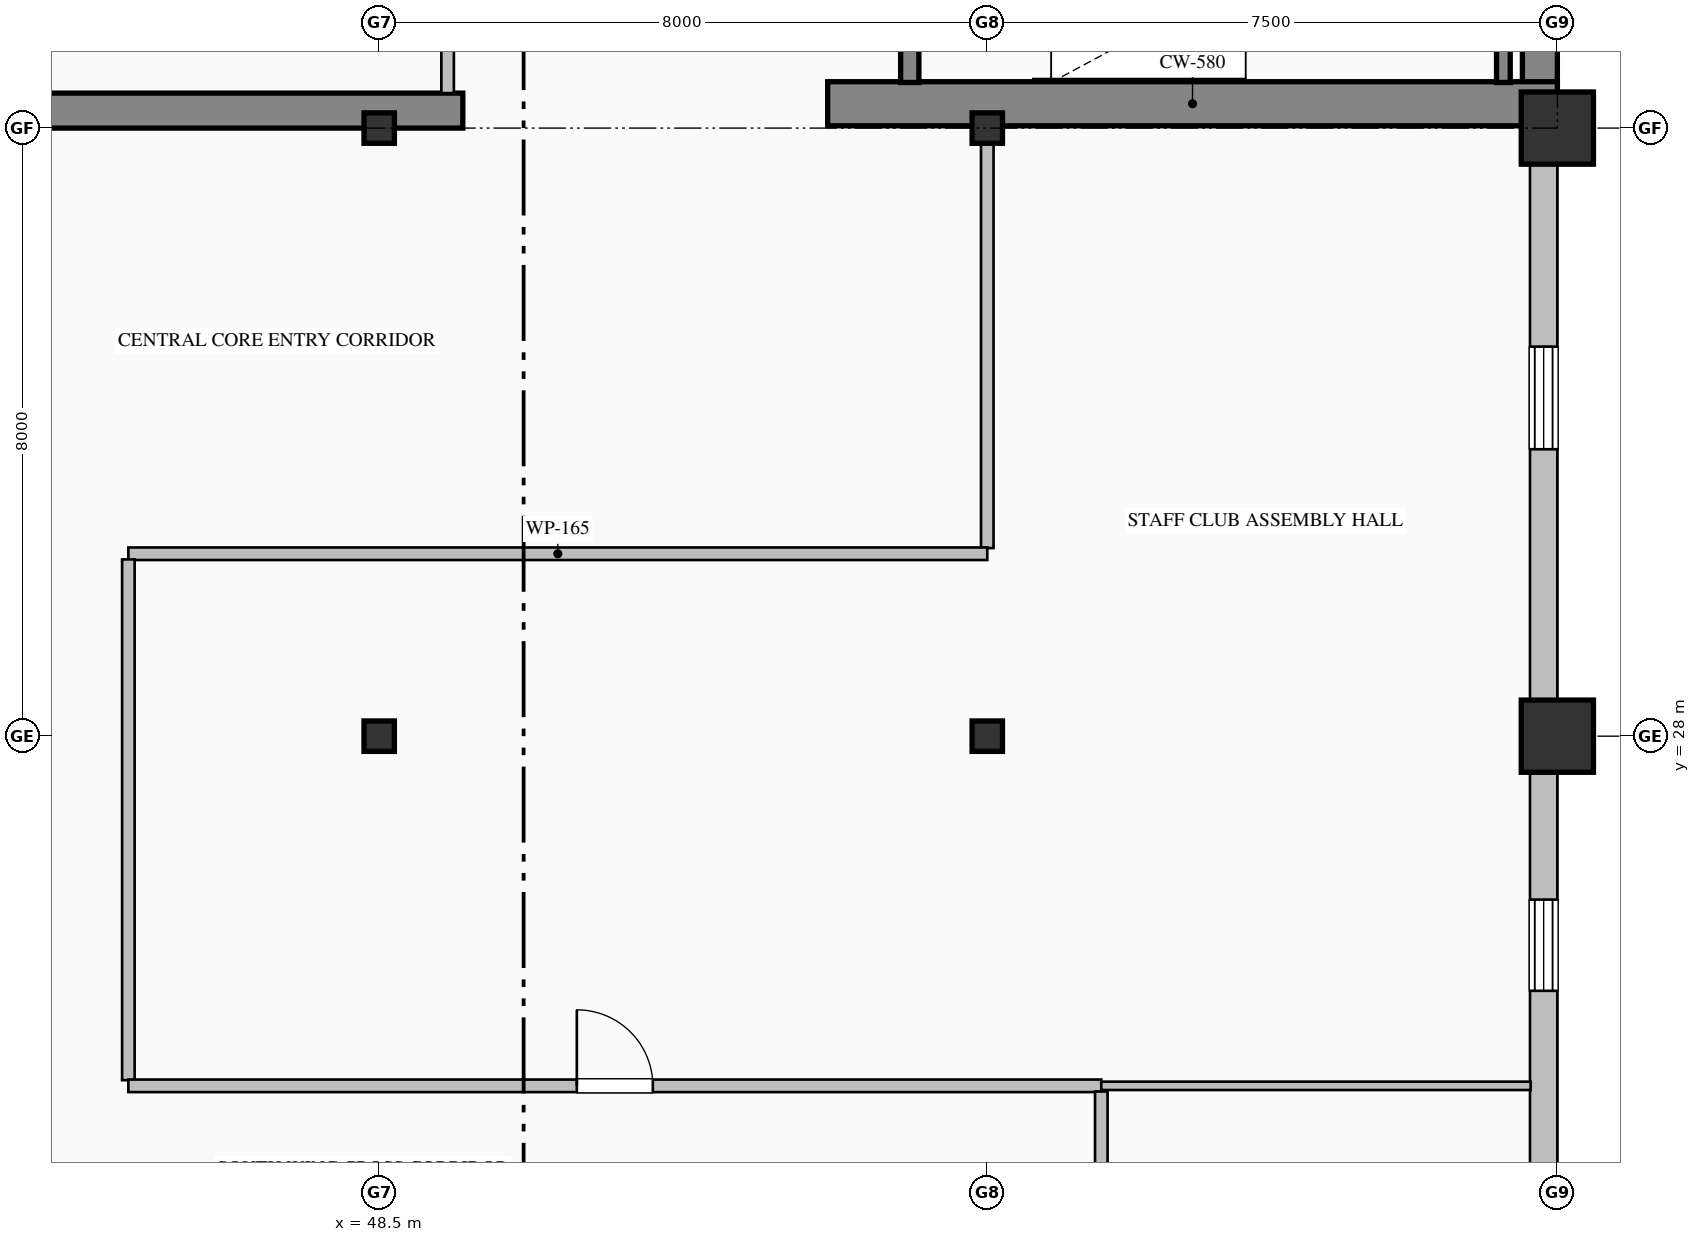
"""IFC4 building model, lengths in metres.
Left out: names, types, materials, properties, quantities, classifications, styles, units other than length and angle.
Written with IfcOpenShell. Run it as: python <this file> out.ifc"""

import sys

from ifc_helpers import new_model, si_unit, direction, frame, frame_2d, origin, origin_2d, place, context, subcontext, project, spatial, rectangle, hollow_rectangle, i_section, extrude, element, fill, save


model = new_model("IFC4")
c1 = context("Model", 3, precision=1e-05, world=origin(), true_north=direction((0.0, 1.0)))
c2 = subcontext(c1, "Body", "Model", "MODEL_VIEW")
j1 = project(units=[si_unit("LENGTHUNIT", "METRE"), si_unit("PLANEANGLEUNIT", "RADIAN")], contexts=[c1])
p1 = place(None, origin())
s1 = spatial("IfcSite", under=j1, at=p1, CompositionType="ELEMENT")
p2 = place(p1, origin())
s2 = spatial("IfcBuilding", under=s1, at=p2, CompositionType="ELEMENT")
p3 = place(p2, frame((0.0, 0.0, 229.8)))
s3 = spatial("IfcBuildingStorey", under=s2, at=p3, CompositionType="ELEMENT", Elevation=229.8)
p4 = place(p3, frame((63.77, 36.32, 0.0), z_axis=(0.0, 0.0, 1.0), x_axis=(0.0, 1.0, 0.0)))
e1 = element("IfcWall", 1, at=p4, inside=s3, PredefinedType="SHEAR", context=c2, shape_type="SweptSolid", body=[
    extrude(rectangle(XDim=15.22, YDim=0.46, at=frame_2d((7.61, 0.0))), origin(), (0.0, 0.0, 1.0), 3.775),
])
p5 = place(p3, frame((40.5, 36.23, 0.0), z_axis=(0.0, 0.0, 1.0), x_axis=(1.0, 0.0, 0.0)))
e2 = element("IfcWall", 2, at=p5, inside=s3, PredefinedType="SHEAR", context=c2, shape_type="SweptSolid", body=[
    extrude(rectangle(XDim=9.1, YDim=0.46, at=frame_2d((4.55, 0.0))), origin(), (0.0, 0.0, 1.0), 3.775),
])
p6 = place(p3, frame((54.4, 36.32, 0.0), z_axis=(0.0, 0.0, 1.0), x_axis=(1.0, 0.0, 0.0)))
e3 = element("IfcWall", 3, at=p6, inside=s3, PredefinedType="SHEAR", context=c2, shape_type="SweptSolid", body=[
    extrude(rectangle(XDim=9.6, YDim=0.58, at=frame_2d((4.8, 0.0))), origin(), (0.0, 0.0, 1.0), 4.0),
])
for number, where, z_axis, x_axis in (
    (4, (48.5, 28.0, 0.0), (0.0, 0.0, 1.0), (1.0, 0.0, 0.0)),
    (5, (48.5, 36.0, 0.0), (0.0, 0.0, 1.0), (1.0, 0.0, 0.0)),
    (6, (56.5, 28.0, 0.0), (0.0, 0.0, 1.0), (1.0, 0.0, 0.0)),
    (7, (56.5, 36.0, 0.0), (0.0, 0.0, 1.0), (1.0, 0.0, 0.0)),
):
    element("IfcColumn", number, at=place(p3, frame(where, z_axis=z_axis, x_axis=x_axis)), inside=s3, PredefinedType="COLUMN", context=c2, shape_type="SweptSolid", body=[
        extrude(i_section(OverallWidth=0.4, OverallDepth=0.4, WebThickness=0.013, FlangeThickness=0.021, FilletRadius=0.022, at=origin_2d()), origin(), (0.0, 0.0, 1.0), 4.0),
    ])
for number, where, z_axis, x_axis in (
    (8, (64.0, 28.0, 0.0), (0.0, 0.0, 1.0), (1.0, 0.0, 0.0)),
    (9, (64.0, 36.0, 0.0), (0.0, 0.0, 1.0), (1.0, 0.0, 0.0)),
):
    element("IfcColumn", number, at=place(p3, frame(where, z_axis=z_axis, x_axis=x_axis)), inside=s3, PredefinedType="COLUMN", context=c2, shape_type="SweptSolid", body=[
        extrude(hollow_rectangle(XDim=0.95, YDim=0.95, WallThickness=0.036, at=origin_2d()), origin(), (0.0, 0.0, 1.0), 4.0),
    ])
p7 = place(p3, frame((63.82, 36.05, 0.0), z_axis=(0.0, 0.0, 1.0), x_axis=(0.0, -1.0, 0.0)))
e10 = element("IfcWall", 10, at=p7, inside=s3, PredefinedType="SOLIDWALL", context=c2, shape_type="SweptSolid", body=[
    extrude(rectangle(XDim=19.55, YDim=0.36, at=frame_2d((9.775, 0.0))), origin(), (0.0, 0.0, 1.0), 3.325),
])
p8 = place(p7, frame((2.925, 0.0, 0.9)))
e11 = element("IfcOpeningElement", 11, at=p8, cuts=e10, PredefinedType="OPENING", context=c2, shape_type="SweptSolid", body=[
    extrude(rectangle(XDim=1.35, YDim=1.85, at=frame_2d((0.675, 0.925))), frame((0.0, 0.19, 0.0), z_axis=(0.0, -1.0, 0.0), x_axis=(1.0, 0.0, 0.0)), (0.0, 0.0, 1.0), 0.38),
])
p9 = place(p7, frame((10.2, 0.0, 0.9)))
e12 = element("IfcOpeningElement", 12, at=p9, cuts=e10, PredefinedType="OPENING", context=c2, shape_type="SweptSolid", body=[
    extrude(rectangle(XDim=1.2, YDim=1.85, at=frame_2d((0.6, 0.925))), frame((0.0, 0.19, 0.0), z_axis=(0.0, -1.0, 0.0), x_axis=(1.0, 0.0, 0.0)), (0.0, 0.0, 1.0), 0.38),
])
p10 = place(p7, frame((13.725, 0.0, 0.9)))
e13 = element("IfcOpeningElement", 13, at=p10, cuts=e10, PredefinedType="OPENING", context=c2, shape_type="SweptSolid", body=[
    extrude(rectangle(XDim=1.35, YDim=1.85, at=frame_2d((0.675, 0.925))), frame((0.0, 0.19, 0.0), z_axis=(0.0, -1.0, 0.0), x_axis=(1.0, 0.0, 0.0)), (0.0, 0.0, 1.0), 0.38),
])
p11 = place(p3, frame((55.48, 39.75, 0.0), z_axis=(0.0, 0.0, 1.0), x_axis=(0.0, -1.0, 0.0)))
e14 = element("IfcWall", 14, at=p11, inside=s3, PredefinedType="SOLIDWALL", context=c2, shape_type="SweptSolid", body=[
    extrude(rectangle(XDim=3.15, YDim=0.24, at=frame_2d((1.575, 0.0))), origin(), (0.0, 0.0, 1.0), 4.0),
])
p12 = place(p11, frame((1.0, 0.0, 0.0)))
e15 = element("IfcOpeningElement", 15, at=p12, cuts=e14, PredefinedType="OPENING", context=c2, shape_type="SweptSolid", body=[
    extrude(rectangle(XDim=1.15, YDim=2.2, at=frame_2d((0.575, 1.1))), frame((0.0, 0.13, 0.0), z_axis=(0.0, -1.0, 0.0), x_axis=(1.0, 0.0, 0.0)), (0.0, 0.0, 1.0), 0.26),
])
p13 = place(p3, frame((63.29, 36.6, 0.0), z_axis=(0.0, 0.0, 1.0), x_axis=(0.0, 1.0, 0.0)))
e16 = element("IfcWall", 16, at=p13, inside=s3, PredefinedType="SOLIDWALL", context=c2, shape_type="SweptSolid", body=[
    extrude(rectangle(XDim=3.15, YDim=0.18, at=frame_2d((1.575, 0.0))), origin(), (0.0, 0.0, 1.0), 4.0),
])
p14 = place(p3, frame((49.4, 36.46, 0.0), z_axis=(0.0, 0.0, 1.0), x_axis=(0.0, 1.0, 0.0)))
e17 = element("IfcWall", 17, at=p14, inside=s3, PredefinedType="PARTITIONING", context=c2, shape_type="SweptSolid", body=[
    extrude(rectangle(XDim=7.69, YDim=0.165, at=frame_2d((3.845, 0.0))), origin(), (0.0, 0.0, 1.0), 3.017),
])
p15 = place(p14, frame((3.345, 0.0, 0.0)))
e18 = element("IfcOpeningElement", 18, at=p15, cuts=e17, PredefinedType="OPENING", context=c2, shape_type="SweptSolid", body=[
    extrude(rectangle(XDim=1.0, YDim=2.15, at=frame_2d((0.5, 1.075))), frame((0.0, 0.093, 0.0), z_axis=(0.0, -1.0, 0.0), x_axis=(1.0, 0.0, 0.0)), (0.0, 0.0, 1.0), 0.185),
])
p16 = place(p3, frame((56.5, 36.0, 0.0), z_axis=(0.0, 0.0, 1.0), x_axis=(0.0, -1.0, 0.0)))
e19 = element("IfcWall", 19, at=p16, inside=s3, PredefinedType="PARTITIONING", context=c2, shape_type="SweptSolid", body=[
    extrude(rectangle(XDim=5.525, YDim=0.165, at=frame_2d((2.763, 0.0))), origin(), (0.0, 0.0, 1.0), 3.179),
])
p17 = place(p3, frame((56.5, 30.4, 0.0), z_axis=(0.0, 0.0, 1.0), x_axis=(-1.0, 0.0, 0.0)))
e20 = element("IfcWall", 20, at=p17, inside=s3, PredefinedType="PARTITIONING", context=c2, shape_type="SweptSolid", body=[
    extrude(rectangle(XDim=11.3, YDim=0.165, at=frame_2d((5.65, 0.0))), origin(), (0.0, 0.0, 1.0), 3.775),
])
p18 = place(p3, frame((45.2, 30.325, 0.0), z_axis=(0.0, 0.0, 1.0), x_axis=(0.0, -1.0, 0.0)))
e21 = element("IfcWall", 21, at=p18, inside=s3, PredefinedType="PARTITIONING", context=c2, shape_type="SweptSolid", body=[
    extrude(rectangle(XDim=6.851, YDim=0.165, at=frame_2d((3.425, 0.0))), origin(), (0.0, 0.0, 1.0), 3.775),
])
p19 = place(p3, frame((45.2, 23.4, 0.0), z_axis=(0.0, 0.0, 1.0), x_axis=(1.0, 0.0, 0.0)))
e22 = element("IfcWall", 22, at=p19, inside=s3, PredefinedType="PARTITIONING", context=c2, shape_type="SweptSolid", body=[
    extrude(rectangle(XDim=12.8, YDim=0.165, at=frame_2d((6.4, 0.0))), origin(), (0.0, 0.0, 1.0), 3.467),
])
p20 = place(p19, frame((5.9, 0.0, 0.0)))
e23 = element("IfcOpeningElement", 23, at=p20, cuts=e22, PredefinedType="OPENING", context=c2, shape_type="SweptSolid", body=[
    extrude(rectangle(XDim=1.0, YDim=2.15, at=frame_2d((0.5, 1.075))), frame((0.0, 0.093, 0.0), z_axis=(0.0, -1.0, 0.0), x_axis=(1.0, 0.0, 0.0)), (0.0, 0.0, 1.0), 0.185),
])
p21 = place(p3, frame((58.0, 23.325, 0.0), z_axis=(0.0, 0.0, 1.0), x_axis=(0.0, -1.0, 0.0)))
e24 = element("IfcWall", 24, at=p21, inside=s3, PredefinedType="PARTITIONING", context=c2, shape_type="SweptSolid", body=[
    extrude(rectangle(XDim=2.051, YDim=0.165, at=frame_2d((1.025, 0.0))), origin(), (0.0, 0.0, 1.0), 3.775),
])
p22 = place(p3, frame((63.648, 23.4, 0.0), z_axis=(0.0, 0.0, 1.0), x_axis=(-1.0, 0.0, 0.0)))
e25 = element("IfcWall", 25, at=p22, inside=s3, PredefinedType="MOVABLE", context=c2, shape_type="SweptSolid", body=[
    extrude(rectangle(XDim=5.648, YDim=0.11, at=frame_2d((2.824, 0.0))), origin(), (0.0, 0.0, 1.0), 3.775),
])
p23 = place(p8, origin())
e26 = element("IfcWindow", 26, at=p23, inside=s3, PartitioningType="DOUBLE_PANEL_VERTICAL", PredefinedType="WINDOW", context=c2, shape_type="SweptSolid", body=[
    extrude(rectangle(XDim=1.35, YDim=1.85, at=frame_2d((0.675, 0.925))), frame((0.0, 0.15, 0.0), z_axis=(0.0, -1.0, 0.0), x_axis=(1.0, 0.0, 0.0)), (0.0, 0.0, 1.0), 0.06),
])
fill(e11, e26)
p24 = place(p9, origin())
e27 = element("IfcWindow", 27, at=p24, inside=s3, PartitioningType="DOUBLE_PANEL_VERTICAL", PredefinedType="WINDOW", context=c2, shape_type="SweptSolid", body=[
    extrude(rectangle(XDim=1.2, YDim=1.85, at=frame_2d((0.6, 0.925))), frame((0.0, 0.15, 0.0), z_axis=(0.0, -1.0, 0.0), x_axis=(1.0, 0.0, 0.0)), (0.0, 0.0, 1.0), 0.06),
])
fill(e12, e27)
p25 = place(p20, origin())
e28 = element("IfcDoor", 28, at=p25, inside=s3, OperationType="SINGLE_SWING_LEFT", PredefinedType="DOOR", context=c2, shape_type="SweptSolid", body=[
    extrude(rectangle(XDim=1.0, YDim=2.15, at=frame_2d((0.5, 1.075))), frame((0.0, 0.025, 0.0), z_axis=(0.0, -1.0, 0.0), x_axis=(1.0, 0.0, 0.0)), (0.0, 0.0, 1.0), 0.05),
])
fill(e23, e28)
save(model, sys.argv[1])
